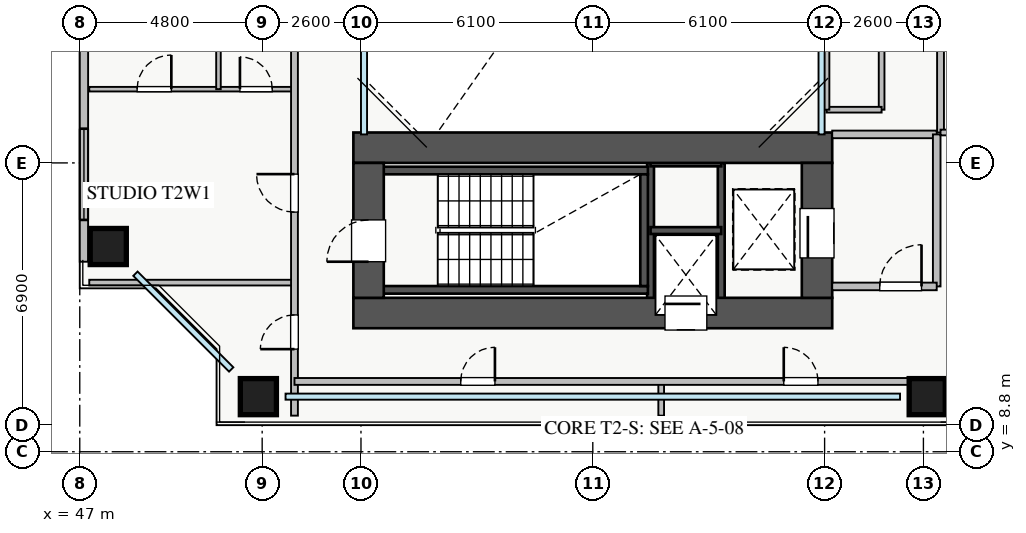
"""IFC4 building model, lengths in metres.
Left out: names, types, materials, properties, quantities, classifications, styles, units other than length and angle.
Written with IfcOpenShell. Run it as: python <this file> out.ifc"""

import sys

from ifc_helpers import new_model, si_unit, direction, frame, frame_2d, origin, origin_2d, place, context, subcontext, project, spatial, rectangle, extrude, source, transform, mapped, element, fill, save


model = new_model("IFC4")
c1 = context("Model", 3, precision=1e-05, world=origin(), true_north=direction((0.0, 1.0)))
c2 = subcontext(c1, "Body", "Model", "MODEL_VIEW")
j1 = project(units=[si_unit("LENGTHUNIT", "METRE"), si_unit("PLANEANGLEUNIT", "RADIAN")], contexts=[c1])
p1 = place(None, origin())
s1 = spatial("IfcSite", under=j1, at=p1, CompositionType="ELEMENT")
p2 = place(p1, origin())
s2 = spatial("IfcBuilding", under=s1, at=p2, CompositionType="ELEMENT")
p3 = place(p2, frame((0.0, 0.0, 32.75)))
s3 = spatial("IfcBuildingStorey", under=s2, at=p3, CompositionType="ELEMENT", Elevation=32.75)
for number, where, z_axis, x_axis in (
    (1, (62.02, 12.45, 0.0), (0.0, 0.0, 1.0), (0.0, 1.0, 0.0)),
    (2, (63.88, 12.45, 0.0), (0.0, 0.0, 1.0), (0.0, 1.0, 0.0)),
):
    element("IfcWall", number, at=place(p3, frame(where, z_axis=z_axis, x_axis=x_axis)), inside=s3, PredefinedType="SHEAR", context=c2, shape_type="SweptSolid", body=[
        extrude(rectangle(XDim=3.95, YDim=0.18, at=frame_2d((1.975, 0.0))), origin(), (0.0, 0.0, 1.0), 3.07),
    ])
for number, where, z_axis, x_axis in (
    (3, (62.02, 14.62, 0.0), (0.0, 0.0, 1.0), (1.0, 0.0, 0.0)),
    (4, (62.02, 16.4, 0.0), (0.0, 0.0, 1.0), (1.0, 0.0, 0.0)),
):
    element("IfcWall", number, at=place(p3, frame(where, z_axis=z_axis, x_axis=x_axis)), inside=s3, PredefinedType="SHEAR", context=c2, shape_type="SweptSolid", body=[
        extrude(rectangle(XDim=1.86, YDim=0.18, at=frame_2d((0.93, 0.0))), origin(), (0.0, 0.0, 1.0), 3.07),
    ])
for number, where, z_axis, x_axis in (
    (5, (54.8, 13.06, 0.0), (0.0, 0.0, 1.0), (1.0, 0.0, 0.0)),
    (6, (54.8, 16.2, 0.0), (0.0, 0.0, 1.0), (1.0, 0.0, 0.0)),
):
    element("IfcWall", number, at=place(p3, frame(where, z_axis=z_axis, x_axis=x_axis)), inside=s3, PredefinedType="SHEAR", context=c2, shape_type="SweptSolid", body=[
        extrude(rectangle(XDim=7.15, YDim=0.2, at=frame_2d((3.575, 0.0))), origin(), (0.0, 0.0, 1.0), 3.25),
    ])
p4 = place(p3, frame((61.85, 13.16, 0.0), z_axis=(0.0, 0.0, 1.0), x_axis=(0.0, 1.0, 0.0)))
e7 = element("IfcWall", 7, at=p4, inside=s3, PredefinedType="SHEAR", context=c2, shape_type="SweptSolid", body=[
    extrude(rectangle(XDim=2.94, YDim=0.2, at=frame_2d((1.47, 0.0))), origin(), (0.0, 0.0, 1.0), 3.25),
])
p5 = place(p3, frame((54.2, 12.45, 0.0), z_axis=(0.0, 0.0, 1.0), x_axis=(1.0, 0.0, 0.0)))
e8 = element("IfcWall", 8, at=p5, inside=s3, PredefinedType="SHEAR", context=c2, shape_type="SweptSolid", body=[
    extrude(rectangle(XDim=12.6, YDim=0.8, at=frame_2d((6.3, 0.0))), origin(), (0.0, 0.0, 1.0), 3.25),
])
p6 = place(p5, frame((8.2, 0.0, 0.0)))
e9 = element("IfcOpeningElement", 9, at=p6, cuts=e8, PredefinedType="OPENING", context=c2, shape_type="SweptSolid", body=[
    extrude(rectangle(XDim=1.1, YDim=2.05, at=frame_2d((0.55, 1.025))), frame((0.0, 0.41, 0.0), z_axis=(0.0, -1.0, 0.0), x_axis=(1.0, 0.0, 0.0)), (0.0, 0.0, 1.0), 0.82),
])
p7 = place(p3, frame((54.2, 16.8, 0.0), z_axis=(0.0, 0.0, 1.0), x_axis=(1.0, 0.0, 0.0)))
e10 = element("IfcWall", 10, at=p7, inside=s3, PredefinedType="SHEAR", context=c2, shape_type="SweptSolid", body=[
    extrude(rectangle(XDim=12.6, YDim=0.8, at=frame_2d((6.3, 0.0))), origin(), (0.0, 0.0, 1.0), 3.25),
])
p8 = place(p3, frame((54.6, 12.85, 0.0), z_axis=(0.0, 0.0, 1.0), x_axis=(0.0, 1.0, 0.0)))
e11 = element("IfcWall", 11, at=p8, inside=s3, PredefinedType="SHEAR", context=c2, shape_type="SweptSolid", body=[
    extrude(rectangle(XDim=3.55, YDim=0.8, at=frame_2d((1.775, 0.0))), origin(), (0.0, 0.0, 1.0), 3.25),
])
p9 = place(p8, frame((0.95, 0.0, 0.0)))
e12 = element("IfcOpeningElement", 12, at=p9, cuts=e11, PredefinedType="OPENING", context=c2, shape_type="SweptSolid", body=[
    extrude(rectangle(XDim=1.1, YDim=2.05, at=frame_2d((0.55, 1.025))), frame((0.0, 0.41, 0.0), z_axis=(0.0, -1.0, 0.0), x_axis=(1.0, 0.0, 0.0)), (0.0, 0.0, 1.0), 0.82),
])
p10 = place(p3, frame((66.4, 12.85, 0.0), z_axis=(0.0, 0.0, 1.0), x_axis=(0.0, 1.0, 0.0)))
e13 = element("IfcWall", 13, at=p10, inside=s3, PredefinedType="SHEAR", context=c2, shape_type="SweptSolid", body=[
    extrude(rectangle(XDim=3.55, YDim=0.8, at=frame_2d((1.775, 0.0))), origin(), (0.0, 0.0, 1.0), 3.25),
])
p11 = place(p10, frame((1.05, 0.0, 0.0)))
e14 = element("IfcOpeningElement", 14, at=p11, cuts=e13, PredefinedType="OPENING", context=c2, shape_type="SweptSolid", body=[
    extrude(rectangle(XDim=1.3, YDim=2.05, at=frame_2d((0.65, 1.025))), frame((0.0, 0.41, 0.0), z_axis=(0.0, -1.0, 0.0), x_axis=(1.0, 0.0, 0.0)), (0.0, 0.0, 1.0), 0.82),
])
m1 = source(origin(), c2, "Body", "SweptSolid", [
    extrude(rectangle(XDim=0.95, YDim=0.95, at=origin_2d()), origin(), (0.0, 0.0, 1.0), 3.25),
])
for number, where, z_axis, x_axis in (
    (15, (51.7, 10.25, 0.0), (0.0, 0.0, 1.0), (1.0, 0.0, 0.0)),
    (16, (69.3, 10.25, 0.0), (0.0, 0.0, 1.0), (1.0, 0.0, 0.0)),
    (17, (47.75, 14.2, 0.0), (0.0, 0.0, 1.0), (1.0, 0.0, 0.0)),
):
    element("IfcColumn", number, at=place(p3, frame(where, z_axis=z_axis, x_axis=x_axis)), inside=s3, PredefinedType="COLUMN", context=c2, shape_type="MappedRepresentation", body=[
        mapped(m1, transform((0.0, 0.0, 0.0), x_axis=(1.0, 0.0, 0.0), y_axis=(0.0, 1.0, 0.0), z_axis=(0.0, 0.0, 1.0), scale=1.0)),
    ])
p12 = place(p3, frame((47.11, 13.8, 0.0), z_axis=(0.0, 0.0, 1.0), x_axis=(0.0, 1.0, 0.0)))
e18 = element("IfcWall", 18, at=p12, inside=s3, PredefinedType="STANDARD", context=c2, shape_type="SweptSolid", body=[
    extrude(rectangle(XDim=18.4, YDim=0.22, at=frame_2d((9.2, 0.0))), origin(), (0.0, 0.0, 1.0), 2.61),
])
p13 = place(p12, frame((1.1, 0.0, 0.9)))
e19 = element("IfcOpeningElement", 19, at=p13, cuts=e18, PredefinedType="OPENING", context=c2, shape_type="SweptSolid", body=[
    extrude(rectangle(XDim=2.4, YDim=1.48, at=frame_2d((1.2, 0.74))), frame((0.0, 0.12, 0.0), z_axis=(0.0, -1.0, 0.0), x_axis=(1.0, 0.0, 0.0)), (0.0, 0.0, 1.0), 0.24),
])
p14 = place(p12, frame((15.05, 0.0, 0.9)))
e20 = element("IfcOpeningElement", 20, at=p14, cuts=e18, PredefinedType="OPENING", context=c2, shape_type="SweptSolid", body=[
    extrude(rectangle(XDim=2.1, YDim=1.48, at=frame_2d((1.05, 0.74))), frame((0.0, 0.12, 0.0), z_axis=(0.0, -1.0, 0.0), x_axis=(1.0, 0.0, 0.0)), (0.0, 0.0, 1.0), 0.24),
])
p15 = place(p12, frame((9.435, 0.0, 0.9)))
e21 = element("IfcOpeningElement", 21, at=p15, cuts=e18, PredefinedType="OPENING", context=c2, shape_type="SweptSolid", body=[
    extrude(rectangle(XDim=0.9, YDim=1.2, at=frame_2d((0.45, 0.6))), frame((0.0, 0.12, 0.0), z_axis=(0.0, -1.0, 0.0), x_axis=(1.0, 0.0, 0.0)), (0.0, 0.0, 1.0), 0.24),
])
p16 = place(p3, frame((66.8, 17.15, 0.0), z_axis=(0.0, 0.0, 1.0), x_axis=(1.0, 0.0, 0.0)))
e22 = element("IfcWall", 22, at=p16, inside=s3, PredefinedType="PARTITIONING", context=c2, shape_type="SweptSolid", body=[
    extrude(rectangle(XDim=2.75, YDim=0.2, at=frame_2d((1.375, 0.0))), origin(), (0.0, 0.0, 1.0), 3.07),
])
p17 = place(p3, frame((69.55, 13.15, 0.0), z_axis=(0.0, 0.0, 1.0), x_axis=(0.0, 1.0, 0.0)))
e23 = element("IfcWall", 23, at=p17, inside=s3, PredefinedType="PARTITIONING", context=c2, shape_type="SweptSolid", body=[
    extrude(rectangle(XDim=4.0, YDim=0.2, at=frame_2d((2.0, 0.0))), origin(), (0.0, 0.0, 1.0), 2.615),
])
p18 = place(p3, frame((66.8, 13.15, 0.0), z_axis=(0.0, 0.0, 1.0), x_axis=(1.0, 0.0, 0.0)))
e24 = element("IfcWall", 24, at=p18, inside=s3, PredefinedType="PARTITIONING", context=c2, shape_type="SweptSolid", body=[
    extrude(rectangle(XDim=2.75, YDim=0.2, at=frame_2d((1.375, 0.0))), origin(), (0.0, 0.0, 1.0), 3.07),
])
p19 = place(p18, frame((1.25, 0.0, 0.0)))
e25 = element("IfcOpeningElement", 25, at=p19, cuts=e24, PredefinedType="OPENING", context=c2, shape_type="SweptSolid", body=[
    extrude(rectangle(XDim=1.1, YDim=2.05, at=frame_2d((0.55, 1.025))), frame((0.0, 0.11, 0.0), z_axis=(0.0, -1.0, 0.0), x_axis=(1.0, 0.0, 0.0)), (0.0, 0.0, 1.0), 0.22),
])
p20 = place(p3, frame((47.25, 13.25, 0.0), z_axis=(0.0, 0.0, 1.0), x_axis=(1.0, 0.0, 0.0)))
e26 = element("IfcWall", 26, at=p20, inside=s3, PredefinedType="PARTITIONING", context=c2, shape_type="SweptSolid", body=[
    extrude(rectangle(XDim=5.4, YDim=0.15, at=frame_2d((2.7, 0.0))), origin(), (0.0, 0.0, 1.0), 3.07),
])
p21 = place(p3, frame((47.25, 18.34, 0.0), z_axis=(0.0, 0.0, 1.0), x_axis=(1.0, 0.0, 0.0)))
e27 = element("IfcWall", 27, at=p21, inside=s3, PredefinedType="PLUMBINGWALL", context=c2, shape_type="SweptSolid", body=[
    extrude(rectangle(XDim=5.4, YDim=0.12, at=frame_2d((2.7, 0.0))), origin(), (0.0, 0.0, 1.0), 2.865),
])
p22 = place(p21, frame((1.26, 0.0, 0.0)))
e28 = element("IfcOpeningElement", 28, at=p22, cuts=e27, PredefinedType="OPENING", context=c2, shape_type="SweptSolid", body=[
    extrude(rectangle(XDim=0.9, YDim=2.05, at=frame_2d((0.45, 1.025))), frame((0.0, 0.07, 0.0), z_axis=(0.0, -1.0, 0.0), x_axis=(1.0, 0.0, 0.0)), (0.0, 0.0, 1.0), 0.14),
])
p23 = place(p21, frame((3.965, 0.0, 0.0)))
e29 = element("IfcOpeningElement", 29, at=p23, cuts=e27, PredefinedType="OPENING", context=c2, shape_type="SweptSolid", body=[
    extrude(rectangle(XDim=0.85, YDim=2.05, at=frame_2d((0.425, 1.025))), frame((0.0, 0.07, 0.0), z_axis=(0.0, -1.0, 0.0), x_axis=(1.0, 0.0, 0.0)), (0.0, 0.0, 1.0), 0.14),
])
p24 = place(p3, frame((50.65, 18.34, 0.0), z_axis=(0.0, 0.0, 1.0), x_axis=(0.0, 1.0, 0.0)))
e30 = element("IfcWall", 30, at=p24, inside=s3, PredefinedType="PLUMBINGWALL", context=c2, shape_type="SweptSolid", body=[
    extrude(rectangle(XDim=4.66, YDim=0.12, at=frame_2d((2.33, 0.0))), origin(), (0.0, 0.0, 1.0), 3.07),
])
p25 = place(p3, frame((52.65, 9.75, 0.0), z_axis=(0.0, 0.0, 1.0), x_axis=(0.0, 1.0, 0.0)))
e31 = element("IfcWall", 31, at=p25, inside=s3, PredefinedType="PARTITIONING", context=c2, shape_type="SweptSolid", body=[
    extrude(rectangle(XDim=26.5, YDim=0.18, at=frame_2d((13.25, 0.0))), origin(), (0.0, 0.0, 1.0), 3.07),
])
p26 = place(p25, frame((23.85, 0.0, 0.0)))
e32 = element("IfcOpeningElement", 32, at=p26, cuts=e31, PredefinedType="OPENING", context=c2, shape_type="SweptSolid", body=[
    extrude(rectangle(XDim=0.9, YDim=2.05, at=frame_2d((0.45, 1.025))), frame((0.0, 0.1, 0.0), z_axis=(0.0, -1.0, 0.0), x_axis=(1.0, 0.0, 0.0)), (0.0, 0.0, 1.0), 0.2),
])
p27 = place(p25, frame((1.75, 0.0, 0.0)))
e33 = element("IfcOpeningElement", 33, at=p27, cuts=e31, PredefinedType="OPENING", context=c2, shape_type="SweptSolid", body=[
    extrude(rectangle(XDim=0.9, YDim=2.05, at=frame_2d((0.45, 1.025))), frame((0.0, 0.1, 0.0), z_axis=(0.0, -1.0, 0.0), x_axis=(1.0, 0.0, 0.0)), (0.0, 0.0, 1.0), 0.2),
])
p28 = place(p25, frame((5.355, 0.0, 0.0)))
e34 = element("IfcOpeningElement", 34, at=p28, cuts=e31, PredefinedType="OPENING", context=c2, shape_type="SweptSolid", body=[
    extrude(rectangle(XDim=1.0, YDim=2.05, at=frame_2d((0.5, 1.025))), frame((0.0, 0.1, 0.0), z_axis=(0.0, -1.0, 0.0), x_axis=(1.0, 0.0, 0.0)), (0.0, 0.0, 1.0), 0.2),
])
p29 = place(p25, frame((15.195, 0.0, 0.0)))
e35 = element("IfcOpeningElement", 35, at=p29, cuts=e31, PredefinedType="OPENING", context=c2, shape_type="SweptSolid", body=[
    extrude(rectangle(XDim=1.0, YDim=2.05, at=frame_2d((0.5, 1.025))), frame((0.0, 0.1, 0.0), z_axis=(0.0, -1.0, 0.0), x_axis=(1.0, 0.0, 0.0)), (0.0, 0.0, 1.0), 0.2),
])
p30 = place(p3, frame((69.65, 17.2, 0.0), z_axis=(0.0, 0.0, 1.0), x_axis=(0.0, 1.0, 0.0)))
e36 = element("IfcWall", 36, at=p30, inside=s3, PredefinedType="PARTITIONING", context=c2, shape_type="SweptSolid", body=[
    extrude(rectangle(XDim=11.6, YDim=0.18, at=frame_2d((5.8, 0.0))), origin(), (0.0, 0.0, 1.0), 3.07),
])
p31 = place(p30, frame((2.26, 0.0, 0.0)))
e37 = element("IfcOpeningElement", 37, at=p31, cuts=e36, PredefinedType="OPENING", context=c2, shape_type="SweptSolid", body=[
    extrude(rectangle(XDim=1.0, YDim=2.05, at=frame_2d((0.5, 1.025))), frame((0.0, 0.1, 0.0), z_axis=(0.0, -1.0, 0.0), x_axis=(1.0, 0.0, 0.0)), (0.0, 0.0, 1.0), 0.2),
])
p32 = place(p3, frame((69.65, 17.2, 0.0), z_axis=(0.0, 0.0, 1.0), x_axis=(1.0, 0.0, 0.0)))
e38 = element("IfcWall", 38, at=p32, inside=s3, PredefinedType="PARTITIONING", context=c2, shape_type="SweptSolid", body=[
    extrude(rectangle(XDim=4.1, YDim=0.15, at=frame_2d((2.05, 0.0))), origin(), (0.0, 0.0, 1.0), 3.07),
])
p33 = place(p3, frame((68.1, 17.8, 0.0), z_axis=(0.0, 0.0, 1.0), x_axis=(0.0, 1.0, 0.0)))
e39 = element("IfcWall", 39, at=p33, inside=s3, PredefinedType="PARTITIONING", context=c2, shape_type="SweptSolid", body=[
    extrude(rectangle(XDim=9.8, YDim=0.15, at=frame_2d((4.9, 0.0))), origin(), (0.0, 0.0, 1.0), 3.07),
])
p34 = place(p33, frame((4.3, 0.0, 0.0)))
e40 = element("IfcOpeningElement", 40, at=p34, cuts=e39, PredefinedType="OPENING", context=c2, shape_type="SweptSolid", body=[
    extrude(rectangle(XDim=0.9, YDim=2.05, at=frame_2d((0.45, 1.025))), frame((0.0, 0.085, 0.0), z_axis=(0.0, -1.0, 0.0), x_axis=(1.0, 0.0, 0.0)), (0.0, 0.0, 1.0), 0.17),
])
p35 = place(p3, frame((66.65, 17.8, 0.0), z_axis=(0.0, 0.0, 1.0), x_axis=(1.0, 0.0, 0.0)))
e41 = element("IfcWall", 41, at=p35, inside=s3, PredefinedType="PARTITIONING", context=c2, shape_type="SweptSolid", body=[
    extrude(rectangle(XDim=1.45, YDim=0.15, at=frame_2d((0.725, 0.0))), origin(), (0.0, 0.0, 1.0), 3.07),
])
p36 = place(p3, frame((66.65, 17.8, 0.0), z_axis=(0.0, 0.0, 1.0), x_axis=(0.0, 1.0, 0.0)))
e42 = element("IfcWall", 42, at=p36, inside=s3, PredefinedType="PARTITIONING", context=c2, shape_type="SweptSolid", body=[
    extrude(rectangle(XDim=9.8, YDim=0.15, at=frame_2d((4.9, 0.0))), origin(), (0.0, 0.0, 1.0), 2.665),
])
for number, where, z_axis, x_axis in (
    (43, (62.3, 9.75, 0.0), (0.0, 0.0, 1.0), (0.0, 1.0, 0.0)),
    (44, (69.65, 9.75, 0.0), (0.0, 0.0, 1.0), (0.0, 1.0, 0.0)),
):
    element("IfcWall", number, at=place(p3, frame(where, z_axis=z_axis, x_axis=x_axis)), inside=s3, PredefinedType="PARTITIONING", context=c2, shape_type="SweptSolid", body=[
        extrude(rectangle(XDim=0.9, YDim=0.15, at=frame_2d((0.45, 0.0))), origin(), (0.0, 0.0, 1.0), 3.07),
    ])
p37 = place(p3, frame((52.65, 10.65, 0.0), z_axis=(0.0, 0.0, 1.0), x_axis=(1.0, 0.0, 0.0)))
e45 = element("IfcWall", 45, at=p37, inside=s3, PredefinedType="PARTITIONING", context=c2, shape_type="SweptSolid", body=[
    extrude(rectangle(XDim=17.0, YDim=0.18, at=frame_2d((8.5, 0.0))), origin(), (0.0, 0.0, 1.0), 3.07),
])
p38 = place(p37, frame((4.375, 0.0, 0.0)))
e46 = element("IfcOpeningElement", 46, at=p38, cuts=e45, PredefinedType="OPENING", context=c2, shape_type="SweptSolid", body=[
    extrude(rectangle(XDim=0.9, YDim=2.05, at=frame_2d((0.45, 1.025))), frame((0.0, 0.1, 0.0), z_axis=(0.0, -1.0, 0.0), x_axis=(1.0, 0.0, 0.0)), (0.0, 0.0, 1.0), 0.2),
])
p39 = place(p37, frame((12.875, 0.0, 0.0)))
e47 = element("IfcOpeningElement", 47, at=p39, cuts=e45, PredefinedType="OPENING", context=c2, shape_type="SweptSolid", body=[
    extrude(rectangle(XDim=0.9, YDim=2.05, at=frame_2d((0.45, 1.025))), frame((0.0, 0.1, 0.0), z_axis=(0.0, -1.0, 0.0), x_axis=(1.0, 0.0, 0.0)), (0.0, 0.0, 1.0), 0.2),
])
m2 = source(origin(), c2, "Body", "SweptSolid", [
    extrude(rectangle(XDim=2.4, YDim=1.48, at=frame_2d((1.2, 0.74))), frame((0.0, 0.03, 0.0), z_axis=(0.0, -1.0, 0.0), x_axis=(1.0, 0.0, 0.0)), (0.0, 0.0, 1.0), 0.06),
])
p40 = place(p13, origin())
e48 = element("IfcWindow", 48, at=p40, inside=s3, PartitioningType="TRIPLE_PANEL_VERTICAL", PredefinedType="WINDOW", context=c2, shape_type="MappedRepresentation", body=[
    mapped(m2, transform((0.0, 0.0, 0.0), x_axis=(1.0, 0.0, 0.0), y_axis=(0.0, 1.0, 0.0), z_axis=(0.0, 0.0, 1.0), scale=1.0)),
])
fill(e19, e48)
m3 = source(origin(), c2, "Body", "SweptSolid", [
    extrude(rectangle(XDim=1.3, YDim=2.05, at=frame_2d((0.65, 1.025))), frame((0.0, 0.025, 0.0), z_axis=(0.0, -1.0, 0.0), x_axis=(1.0, 0.0, 0.0)), (0.0, 0.0, 1.0), 0.05),
])
p41 = place(p11, origin())
e49 = element("IfcDoor", 49, at=p41, inside=s3, OperationType="SLIDING_TO_RIGHT", PredefinedType="DOOR", context=c2, shape_type="MappedRepresentation", body=[
    mapped(m3, transform((0.0, 0.0, 0.0), x_axis=(1.0, 0.0, 0.0), y_axis=(0.0, 1.0, 0.0), z_axis=(0.0, 0.0, 1.0), scale=1.0)),
])
fill(e14, e49)
m4 = source(origin(), c2, "Body", "SweptSolid", [
    extrude(rectangle(XDim=1.1, YDim=2.05, at=frame_2d((0.55, 1.025))), frame((0.0, 0.025, 0.0), z_axis=(0.0, -1.0, 0.0), x_axis=(1.0, 0.0, 0.0)), (0.0, 0.0, 1.0), 0.05),
])
p42 = place(p9, origin())
e50 = element("IfcDoor", 50, at=p42, inside=s3, OperationType="SINGLE_SWING_LEFT", PredefinedType="DOOR", context=c2, shape_type="MappedRepresentation", body=[
    mapped(m4, transform((0.0, 0.0, 0.0), x_axis=(1.0, 0.0, 0.0), y_axis=(0.0, 1.0, 0.0), z_axis=(0.0, 0.0, 1.0), scale=1.0)),
])
fill(e12, e50)
p43 = place(p6, origin())
e51 = element("IfcDoor", 51, at=p43, inside=s3, OperationType="SLIDING_TO_RIGHT", PredefinedType="DOOR", context=c2, shape_type="MappedRepresentation", body=[
    mapped(m4, transform((0.0, 0.0, 0.0), x_axis=(1.0, 0.0, 0.0), y_axis=(0.0, 1.0, 0.0), z_axis=(0.0, 0.0, 1.0), scale=1.0)),
])
fill(e9, e51)
p44 = place(p19, origin())
e52 = element("IfcDoor", 52, at=p44, inside=s3, OperationType="SINGLE_SWING_RIGHT", PredefinedType="DOOR", context=c2, shape_type="MappedRepresentation", body=[
    mapped(m4, transform((0.0, 0.0, 0.0), x_axis=(1.0, 0.0, 0.0), y_axis=(0.0, 1.0, 0.0), z_axis=(0.0, 0.0, 1.0), scale=1.0)),
])
fill(e25, e52)
m5 = source(origin(), c2, "Body", "SweptSolid", [
    extrude(rectangle(XDim=0.9, YDim=2.05, at=frame_2d((0.45, 1.025))), frame((0.0, 0.025, 0.0), z_axis=(0.0, -1.0, 0.0), x_axis=(1.0, 0.0, 0.0)), (0.0, 0.0, 1.0), 0.05),
])
p45 = place(p22, origin())
e53 = element("IfcDoor", 53, at=p45, inside=s3, OperationType="SINGLE_SWING_RIGHT", PredefinedType="DOOR", context=c2, shape_type="MappedRepresentation", body=[
    mapped(m5, transform((0.0, 0.0, 0.0), x_axis=(1.0, 0.0, 0.0), y_axis=(0.0, 1.0, 0.0), z_axis=(0.0, 0.0, 1.0), scale=1.0)),
])
fill(e28, e53)
m6 = source(origin(), c2, "Body", "SweptSolid", [
    extrude(rectangle(XDim=0.85, YDim=2.05, at=frame_2d((0.425, 1.025))), frame((0.0, 0.025, 0.0), z_axis=(0.0, -1.0, 0.0), x_axis=(1.0, 0.0, 0.0)), (0.0, 0.0, 1.0), 0.05),
])
p46 = place(p23, origin())
e54 = element("IfcDoor", 54, at=p46, inside=s3, OperationType="SINGLE_SWING_LEFT", PredefinedType="DOOR", context=c2, shape_type="MappedRepresentation", body=[
    mapped(m6, transform((0.0, 0.0, 0.0), x_axis=(1.0, 0.0, 0.0), y_axis=(0.0, 1.0, 0.0), z_axis=(0.0, 0.0, 1.0), scale=1.0)),
])
fill(e29, e54)
p47 = place(p27, origin())
e55 = element("IfcDoor", 55, at=p47, inside=s3, OperationType="SINGLE_SWING_LEFT", PredefinedType="DOOR", context=c2, shape_type="MappedRepresentation", body=[
    mapped(m5, transform((0.0, 0.0, 0.0), x_axis=(1.0, 0.0, 0.0), y_axis=(0.0, 1.0, 0.0), z_axis=(0.0, 0.0, 1.0), scale=1.0)),
])
fill(e33, e55)
m7 = source(origin(), c2, "Body", "SweptSolid", [
    extrude(rectangle(XDim=1.0, YDim=2.05, at=frame_2d((0.5, 1.025))), frame((0.0, 0.025, 0.0), z_axis=(0.0, -1.0, 0.0), x_axis=(1.0, 0.0, 0.0)), (0.0, 0.0, 1.0), 0.05),
])
p48 = place(p28, origin())
e56 = element("IfcDoor", 56, at=p48, inside=s3, OperationType="SINGLE_SWING_RIGHT", PredefinedType="DOOR", context=c2, shape_type="MappedRepresentation", body=[
    mapped(m7, transform((0.0, 0.0, 0.0), x_axis=(1.0, 0.0, 0.0), y_axis=(0.0, 1.0, 0.0), z_axis=(0.0, 0.0, 1.0), scale=1.0)),
])
fill(e34, e56)
p49 = place(p38, origin())
e57 = element("IfcDoor", 57, at=p49, inside=s3, OperationType="SINGLE_SWING_RIGHT", PredefinedType="DOOR", context=c2, shape_type="MappedRepresentation", body=[
    mapped(m5, transform((0.0, 0.0, 0.0), x_axis=(1.0, 0.0, 0.0), y_axis=(0.0, 1.0, 0.0), z_axis=(0.0, 0.0, 1.0), scale=1.0)),
])
fill(e46, e57)
p50 = place(p39, origin())
e58 = element("IfcDoor", 58, at=p50, inside=s3, OperationType="SINGLE_SWING_LEFT", PredefinedType="DOOR", context=c2, shape_type="MappedRepresentation", body=[
    mapped(m5, transform((0.0, 0.0, 0.0), x_axis=(1.0, 0.0, 0.0), y_axis=(0.0, 1.0, 0.0), z_axis=(0.0, 0.0, 1.0), scale=1.0)),
])
fill(e47, e58)
save(model, sys.argv[1])
